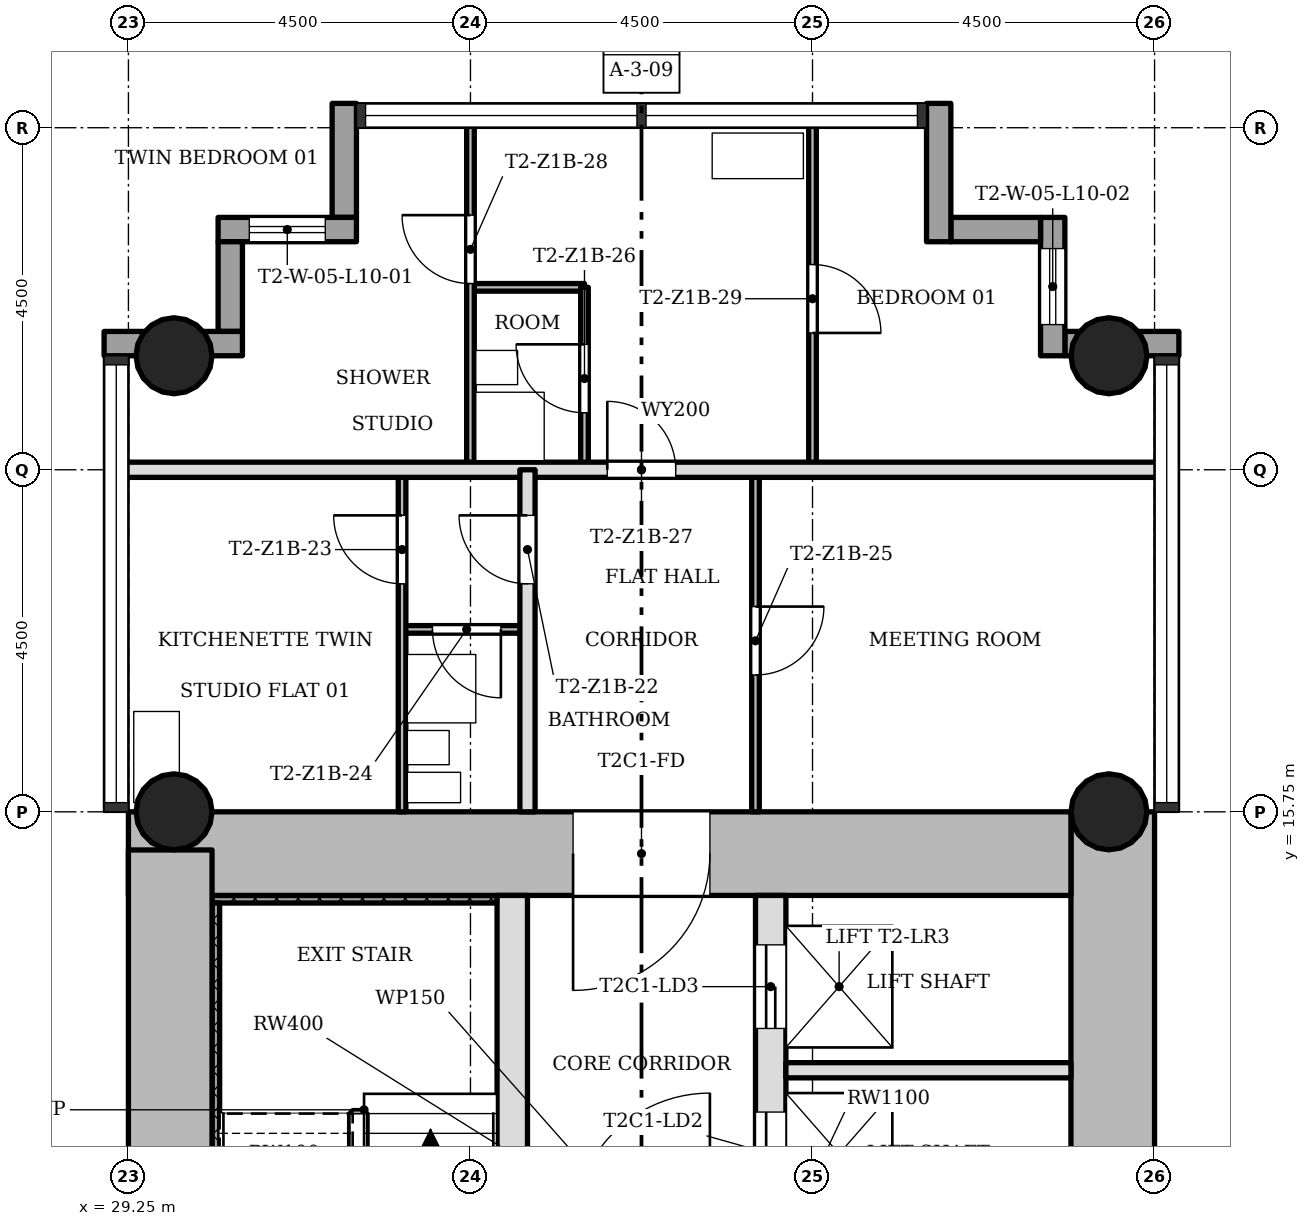
"""IFC4 building model, lengths in metres.
Left out: names, types, materials, properties, quantities, classifications, styles, units other than length and angle.
Written with IfcOpenShell. Run it as: python <this file> out.ifc"""

import sys

from ifc_helpers import new_model, si_unit, direction, frame, frame_2d, origin, origin_2d, place, context, subcontext, project, spatial, rectangle, hollow_circle, extrude, element, fill, save


model = new_model("IFC4")
c1 = context("Model", 3, precision=1e-05, world=origin(), true_north=direction((0.0, 1.0)))
c2 = subcontext(c1, "Body", "Model", "MODEL_VIEW")
j1 = project(units=[si_unit("LENGTHUNIT", "METRE"), si_unit("PLANEANGLEUNIT", "RADIAN")], contexts=[c1])
p1 = place(None, origin())
s1 = spatial("IfcSite", under=j1, at=p1, CompositionType="ELEMENT")
p2 = place(p1, origin())
s2 = spatial("IfcBuilding", under=s1, at=p2, CompositionType="ELEMENT")
p3 = place(p2, frame((0.0, 0.0, 41.5)))
s3 = spatial("IfcBuildingStorey", under=s2, at=p3, CompositionType="ELEMENT", Elevation=41.5)
p4 = place(p3, frame((42.2, 7.85, 0.0), z_axis=(0.0, 0.0, 1.0), x_axis=(0.0, 1.0, 0.0)))
e1 = element("IfcWall", 1, at=p4, inside=s3, PredefinedType="SHEAR", context=c2, shape_type="SweptSolid", body=[
    extrude(rectangle(XDim=7.9, YDim=1.1, at=frame_2d((3.95, 0.0))), origin(), (0.0, 0.0, 1.0), 3.4),
])
p5 = place(p3, frame((41.65, 15.2, 0.0), z_axis=(0.0, 0.0, 1.0), x_axis=(-1.0, 0.0, 0.0)))
e2 = element("IfcWall", 2, at=p5, inside=s3, PredefinedType="SHEAR", context=c2, shape_type="SweptSolid", body=[
    extrude(rectangle(XDim=12.4, YDim=1.1, at=frame_2d((6.2, 0.0))), origin(), (0.0, 0.0, 1.0), 3.4),
])
p6 = place(p5, frame((4.75, 0.0, 0.0)))
e3 = element("IfcOpeningElement", 3, at=p6, cuts=e2, PredefinedType="OPENING", context=c2, shape_type="SweptSolid", body=[
    extrude(rectangle(XDim=1.8, YDim=2.1, at=frame_2d((0.9, 1.05))), frame((0.0, 0.56, 0.0), z_axis=(0.0, -1.0, 0.0), x_axis=(1.0, 0.0, 0.0)), (0.0, 0.0, 1.0), 1.12),
])
p7 = place(p3, frame((29.8, 15.248, 0.0), z_axis=(0.0, 0.0, 1.0), x_axis=(0.0, -1.0, 0.0)))
e4 = element("IfcWall", 4, at=p7, inside=s3, PredefinedType="SHEAR", context=c2, shape_type="SweptSolid", body=[
    extrude(rectangle(XDim=8.596, YDim=1.1, at=frame_2d((4.298, 0.0))), origin(), (0.0, 0.0, 1.0), 3.4),
])
p8 = place(p3, frame((34.3, 7.85, 0.0), z_axis=(0.0, 0.0, 1.0), x_axis=(0.0, 1.0, 0.0)))
e5 = element("IfcWall", 5, at=p8, inside=s3, PredefinedType="SHEAR", context=c2, shape_type="SweptSolid", body=[
    extrude(rectangle(XDim=6.8, YDim=0.4, at=frame_2d((3.4, 0.0))), origin(), (0.0, 0.0, 1.0), 3.4),
])
p9 = place(p8, frame((0.55, 0.0, 0.0)))
e6 = element("IfcOpeningElement", 6, at=p9, cuts=e5, PredefinedType="OPENING", context=c2, shape_type="SweptSolid", body=[
    extrude(rectangle(XDim=0.9, YDim=2.1, at=frame_2d((0.45, 1.05))), frame((0.0, 0.21, 0.0), z_axis=(0.0, -1.0, 0.0), x_axis=(1.0, 0.0, 0.0)), (0.0, 0.0, 1.0), 0.42),
])
p10 = place(p3, frame((37.7, 7.85, 0.0), z_axis=(0.0, 0.0, 1.0), x_axis=(0.0, 1.0, 0.0)))
e7 = element("IfcWall", 7, at=p10, inside=s3, PredefinedType="SHEAR", context=c2, shape_type="SweptSolid", body=[
    extrude(rectangle(XDim=6.8, YDim=0.4, at=frame_2d((3.4, 0.0))), origin(), (0.0, 0.0, 1.0), 3.4),
])
p11 = place(p10, frame((0.65, 0.0, 0.0)))
e8 = element("IfcOpeningElement", 8, at=p11, cuts=e7, PredefinedType="OPENING", context=c2, shape_type="SweptSolid", body=[
    extrude(rectangle(XDim=1.1, YDim=2.1, at=frame_2d((0.55, 1.05))), frame((0.0, 0.21, 0.0), z_axis=(0.0, -1.0, 0.0), x_axis=(1.0, 0.0, 0.0)), (0.0, 0.0, 1.0), 0.42),
])
p12 = place(p10, frame((2.85, 0.0, 0.0)))
e9 = element("IfcOpeningElement", 9, at=p12, cuts=e7, PredefinedType="OPENING", context=c2, shape_type="SweptSolid", body=[
    extrude(rectangle(XDim=1.1, YDim=2.1, at=frame_2d((0.55, 1.05))), frame((0.0, 0.21, 0.0), z_axis=(0.0, -1.0, 0.0), x_axis=(1.0, 0.0, 0.0)), (0.0, 0.0, 1.0), 0.42),
])
p13 = place(p10, frame((5.05, 0.0, 0.0)))
e10 = element("IfcOpeningElement", 10, at=p13, cuts=e7, PredefinedType="OPENING", context=c2, shape_type="SweptSolid", body=[
    extrude(rectangle(XDim=1.1, YDim=2.1, at=frame_2d((0.55, 1.05))), frame((0.0, 0.21, 0.0), z_axis=(0.0, -1.0, 0.0), x_axis=(1.0, 0.0, 0.0)), (0.0, 0.0, 1.0), 0.42),
])
for number, where, z_axis, x_axis in (
    (11, (42.15, 15.75, 0.0), (0.0, 0.0, 1.0), (1.0, 0.0, 0.0)),
    (12, (29.85, 15.75, 0.0), (0.0, 0.0, 1.0), (1.0, 0.0, 0.0)),
    (13, (42.15, 21.75, 0.0), (0.0, 0.0, 1.0), (1.0, 0.0, 0.0)),
    (14, (29.85, 21.75, 0.0), (0.0, 0.0, 1.0), (1.0, 0.0, 0.0)),
):
    element("IfcColumn", number, at=place(p3, frame(where, z_axis=z_axis, x_axis=x_axis)), inside=s3, PredefinedType="COLUMN", context=c2, shape_type="SweptSolid", body=[
        extrude(hollow_circle(Radius=0.5, WallThickness=0.036, at=origin_2d()), origin(), (0.0, 0.0, 1.0), 3.4),
    ])
p14 = place(p3, frame((43.07, 21.91, -0.3), z_axis=(0.0, 0.0, 1.0), x_axis=(-1.0, 0.0, 0.0)))
e15 = element("IfcWall", 15, at=p14, inside=s3, PredefinedType="STANDARD", context=c2, shape_type="SweptSolid", body=[
    extrude(rectangle(XDim=1.5, YDim=0.32, at=frame_2d((0.75, 0.0))), origin(), (0.0, 0.0, 1.0), 3.4),
])
p15 = place(p3, frame((41.41, 21.75, -0.3), z_axis=(0.0, 0.0, 1.0), x_axis=(0.0, 1.0, 0.0)))
e16 = element("IfcWall", 16, at=p15, inside=s3, PredefinedType="STANDARD", context=c2, shape_type="SweptSolid", body=[
    extrude(rectangle(XDim=1.82, YDim=0.32, at=frame_2d((0.91, 0.0))), origin(), (0.0, 0.0, 1.0), 3.4),
])
p16 = place(p15, frame((0.41, 0.0, 1.2)))
e17 = element("IfcOpeningElement", 17, at=p16, cuts=e16, PredefinedType="OPENING", context=c2, shape_type="SweptSolid", body=[
    extrude(rectangle(XDim=1.0, YDim=1.5, at=frame_2d((0.5, 0.75))), frame((0.0, 0.17, 0.0), z_axis=(0.0, -1.0, 0.0), x_axis=(1.0, 0.0, 0.0)), (0.0, 0.0, 1.0), 0.34),
])
p17 = place(p3, frame((41.25, 23.41, -0.3), z_axis=(0.0, 0.0, 1.0), x_axis=(-1.0, 0.0, 0.0)))
e18 = element("IfcWall", 18, at=p17, inside=s3, PredefinedType="STANDARD", context=c2, shape_type="SweptSolid", body=[
    extrude(rectangle(XDim=1.18, YDim=0.32, at=frame_2d((0.59, 0.0))), origin(), (0.0, 0.0, 1.0), 3.4),
])
p18 = place(p3, frame((39.91, 23.25, -0.3), z_axis=(0.0, 0.0, 1.0), x_axis=(0.0, 1.0, 0.0)))
e19 = element("IfcWall", 19, at=p18, inside=s3, PredefinedType="STANDARD", context=c2, shape_type="SweptSolid", body=[
    extrude(rectangle(XDim=1.82, YDim=0.32, at=frame_2d((0.91, 0.0))), origin(), (0.0, 0.0, 1.0), 3.4),
])
p19 = place(p3, frame((32.09, 25.07, -0.3), z_axis=(0.0, 0.0, 1.0), x_axis=(0.0, -1.0, 0.0)))
e20 = element("IfcWall", 20, at=p19, inside=s3, PredefinedType="STANDARD", context=c2, shape_type="SweptSolid", body=[
    extrude(rectangle(XDim=1.5, YDim=0.32, at=frame_2d((0.75, 0.0))), origin(), (0.0, 0.0, 1.0), 3.4),
])
p20 = place(p3, frame((32.25, 23.41, -0.3), z_axis=(0.0, 0.0, 1.0), x_axis=(-1.0, 0.0, 0.0)))
e21 = element("IfcWall", 21, at=p20, inside=s3, PredefinedType="STANDARD", context=c2, shape_type="SweptSolid", body=[
    extrude(rectangle(XDim=1.82, YDim=0.32, at=frame_2d((0.91, 0.0))), origin(), (0.0, 0.0, 1.0), 3.4),
])
p21 = place(p20, frame((0.41, 0.0, 1.2)))
e22 = element("IfcOpeningElement", 22, at=p21, cuts=e21, PredefinedType="OPENING", context=c2, shape_type="SweptSolid", body=[
    extrude(rectangle(XDim=1.0, YDim=1.5, at=frame_2d((0.5, 0.75))), frame((0.0, 0.17, 0.0), z_axis=(0.0, -1.0, 0.0), x_axis=(1.0, 0.0, 0.0)), (0.0, 0.0, 1.0), 0.34),
])
p22 = place(p3, frame((30.59, 23.25, -0.3), z_axis=(0.0, 0.0, 1.0), x_axis=(0.0, -1.0, 0.0)))
e23 = element("IfcWall", 23, at=p22, inside=s3, PredefinedType="STANDARD", context=c2, shape_type="SweptSolid", body=[
    extrude(rectangle(XDim=1.18, YDim=0.32, at=frame_2d((0.59, 0.0))), origin(), (0.0, 0.0, 1.0), 3.4),
])
p23 = place(p3, frame((30.75, 21.91, -0.3), z_axis=(0.0, 0.0, 1.0), x_axis=(-1.0, 0.0, 0.0)))
e24 = element("IfcWall", 24, at=p23, inside=s3, PredefinedType="STANDARD", context=c2, shape_type="SweptSolid", body=[
    extrude(rectangle(XDim=1.82, YDim=0.32, at=frame_2d((0.91, 0.0))), origin(), (0.0, 0.0, 1.0), 3.4),
])
p24 = place(p3, frame((41.65, 12.35, 0.0), z_axis=(0.0, 0.0, 1.0), x_axis=(-1.0, 0.0, 0.0)))
e25 = element("IfcWall", 25, at=p24, inside=s3, PredefinedType="SOLIDWALL", context=c2, shape_type="SweptSolid", body=[
    extrude(rectangle(XDim=3.75, YDim=0.2, at=frame_2d((1.875, 0.0))), origin(), (0.0, 0.0, 1.0), 3.0),
])
p25 = place(p3, frame((34.5, 18.15, 0.0), z_axis=(0.0, 0.0, 1.0), x_axis=(-1.0, 0.0, 0.0)))
e26 = element("IfcWall", 26, at=p25, inside=s3, PredefinedType="PARTITIONING", context=c2, shape_type="SweptSolid", body=[
    extrude(rectangle(XDim=1.65, YDim=0.1, at=frame_2d((0.825, 0.0))), origin(), (0.0, 0.0, 1.0), 3.0),
])
p26 = place(p25, frame((0.35, 0.0, 0.0)))
e27 = element("IfcOpeningElement", 27, at=p26, cuts=e26, PredefinedType="OPENING", context=c2, shape_type="SweptSolid", body=[
    extrude(rectangle(XDim=0.9, YDim=2.1, at=frame_2d((0.45, 1.05))), frame((0.0, 0.06, 0.0), z_axis=(0.0, -1.0, 0.0), x_axis=(1.0, 0.0, 0.0)), (0.0, 0.0, 1.0), 0.12),
])
p27 = place(p3, frame((42.85, 20.25, 0.0), z_axis=(0.0, 0.0, 1.0), x_axis=(-1.0, 0.0, 0.0)))
e28 = element("IfcWall", 28, at=p27, inside=s3, PredefinedType="SOLIDWALL", context=c2, shape_type="SweptSolid", body=[
    extrude(rectangle(XDim=13.7, YDim=0.2, at=frame_2d((6.85, 0.0))), origin(), (0.0, 0.0, 1.0), 3.0),
])
p28 = place(p27, frame((6.4, 0.0, 0.0)))
e29 = element("IfcOpeningElement", 29, at=p28, cuts=e28, PredefinedType="OPENING", context=c2, shape_type="SweptSolid", body=[
    extrude(rectangle(XDim=0.9, YDim=2.1, at=frame_2d((0.45, 1.05))), frame((0.0, 0.11, 0.0), z_axis=(0.0, -1.0, 0.0), x_axis=(1.0, 0.0, 0.0)), (0.0, 0.0, 1.0), 0.22),
])
p29 = place(p3, frame((35.25, 22.65, 0.0), z_axis=(0.0, 0.0, 1.0), x_axis=(-1.0, 0.0, 0.0)))
e30 = element("IfcWall", 30, at=p29, inside=s3, PredefinedType="PARTITIONING", context=c2, shape_type="SweptSolid", body=[
    extrude(rectangle(XDim=1.5, YDim=0.1, at=frame_2d((0.75, 0.0))), origin(), (0.0, 0.0, 1.0), 3.0),
])
p30 = place(p3, frame((38.25, 20.25, 0.0), z_axis=(0.0, 0.0, 1.0), x_axis=(0.0, 1.0, 0.0)))
e31 = element("IfcWall", 31, at=p30, inside=s3, PredefinedType="PARTITIONING", context=c2, shape_type="SweptSolid", body=[
    extrude(rectangle(XDim=4.6, YDim=0.1, at=frame_2d((2.3, 0.0))), origin(), (0.0, 0.0, 1.0), 3.0),
])
p31 = place(p30, frame((1.8, 0.0, 0.0)))
e32 = element("IfcOpeningElement", 32, at=p31, cuts=e31, PredefinedType="OPENING", context=c2, shape_type="SweptSolid", body=[
    extrude(rectangle(XDim=0.9, YDim=2.1, at=frame_2d((0.45, 1.05))), frame((0.0, 0.06, 0.0), z_axis=(0.0, -1.0, 0.0), x_axis=(1.0, 0.0, 0.0)), (0.0, 0.0, 1.0), 0.12),
])
p32 = place(p3, frame((37.5, 15.75, 0.0), z_axis=(0.0, 0.0, 1.0), x_axis=(0.0, 1.0, 0.0)))
e33 = element("IfcWall", 33, at=p32, inside=s3, PredefinedType="PARTITIONING", context=c2, shape_type="SweptSolid", body=[
    extrude(rectangle(XDim=4.5, YDim=0.1, at=frame_2d((2.25, 0.0))), origin(), (0.0, 0.0, 1.0), 3.0),
])
p33 = place(p32, frame((1.8, 0.0, 0.0)))
e34 = element("IfcOpeningElement", 34, at=p33, cuts=e33, PredefinedType="OPENING", context=c2, shape_type="SweptSolid", body=[
    extrude(rectangle(XDim=0.9, YDim=2.1, at=frame_2d((0.45, 1.05))), frame((0.0, 0.06, 0.0), z_axis=(0.0, -1.0, 0.0), x_axis=(1.0, 0.0, 0.0)), (0.0, 0.0, 1.0), 0.12),
])
p34 = place(p3, frame((35.25, 20.25, 0.0), z_axis=(0.0, 0.0, 1.0), x_axis=(0.0, 1.0, 0.0)))
e35 = element("IfcWall", 35, at=p34, inside=s3, PredefinedType="PARTITIONING", context=c2, shape_type="SweptSolid", body=[
    extrude(rectangle(XDim=2.4, YDim=0.1, at=frame_2d((1.2, 0.0))), origin(), (0.0, 0.0, 1.0), 3.0),
])
p35 = place(p34, frame((0.75, 0.0, 0.0)))
e36 = element("IfcOpeningElement", 36, at=p35, cuts=e35, PredefinedType="OPENING", context=c2, shape_type="SweptSolid", body=[
    extrude(rectangle(XDim=0.9, YDim=2.1, at=frame_2d((0.45, 1.05))), frame((0.0, 0.06, 0.0), z_axis=(0.0, -1.0, 0.0), x_axis=(1.0, 0.0, 0.0)), (0.0, 0.0, 1.0), 0.12),
])
p36 = place(p3, frame((34.5, 15.75, 0.0), z_axis=(0.0, 0.0, 1.0), x_axis=(0.0, 1.0, 0.0)))
e37 = element("IfcWall", 37, at=p36, inside=s3, PredefinedType="SOLIDWALL", context=c2, shape_type="SweptSolid", body=[
    extrude(rectangle(XDim=4.5, YDim=0.2, at=frame_2d((2.25, 0.0))), origin(), (0.0, 0.0, 1.0), 3.0),
])
p37 = place(p36, frame((3.0, 0.0, 0.0)))
e38 = element("IfcOpeningElement", 38, at=p37, cuts=e37, PredefinedType="OPENING", context=c2, shape_type="SweptSolid", body=[
    extrude(rectangle(XDim=0.9, YDim=2.1, at=frame_2d((0.45, 1.05))), frame((0.0, 0.11, 0.0), z_axis=(0.0, -1.0, 0.0), x_axis=(1.0, 0.0, 0.0)), (0.0, 0.0, 1.0), 0.22),
])
p38 = place(p3, frame((33.75, 20.25, 0.0), z_axis=(0.0, 0.0, 1.0), x_axis=(0.0, 1.0, 0.0)))
e39 = element("IfcWall", 39, at=p38, inside=s3, PredefinedType="PARTITIONING", context=c2, shape_type="SweptSolid", body=[
    extrude(rectangle(XDim=4.6, YDim=0.1, at=frame_2d((2.3, 0.0))), origin(), (0.0, 0.0, 1.0), 3.0),
])
p39 = place(p38, frame((2.45, 0.0, 0.0)))
e40 = element("IfcOpeningElement", 40, at=p39, cuts=e39, PredefinedType="OPENING", context=c2, shape_type="SweptSolid", body=[
    extrude(rectangle(XDim=0.9, YDim=2.1, at=frame_2d((0.45, 1.05))), frame((0.0, 0.06, 0.0), z_axis=(0.0, -1.0, 0.0), x_axis=(1.0, 0.0, 0.0)), (0.0, 0.0, 1.0), 0.12),
])
p40 = place(p3, frame((32.85, 15.75, 0.0), z_axis=(0.0, 0.0, 1.0), x_axis=(0.0, 1.0, 0.0)))
e41 = element("IfcWall", 41, at=p40, inside=s3, PredefinedType="PARTITIONING", context=c2, shape_type="SweptSolid", body=[
    extrude(rectangle(XDim=4.5, YDim=0.1, at=frame_2d((2.25, 0.0))), origin(), (0.0, 0.0, 1.0), 3.0),
])
p41 = place(p40, frame((3.0, 0.0, 0.0)))
e42 = element("IfcOpeningElement", 42, at=p41, cuts=e41, PredefinedType="OPENING", context=c2, shape_type="SweptSolid", body=[
    extrude(rectangle(XDim=0.9, YDim=2.1, at=frame_2d((0.45, 1.05))), frame((0.0, 0.06, 0.0), z_axis=(0.0, -1.0, 0.0), x_axis=(1.0, 0.0, 0.0)), (0.0, 0.0, 1.0), 0.12),
])
p42 = place(p3, frame((34.1, 14.6, 0.0), z_axis=(0.0, 0.0, 1.0), x_axis=(-1.0, 0.0, 0.0)))
e43 = element("IfcWall", 43, at=p42, inside=s3, PredefinedType="SHEAR", context=c2, shape_type="SweptSolid", body=[
    extrude(rectangle(XDim=3.75, YDim=0.1, at=frame_2d((1.875, 0.0))), origin(), (0.0, 0.0, 1.0), 3.4),
])
p43 = place(p3, frame((30.4, 7.95, 0.0), z_axis=(0.0, 0.0, 1.0), x_axis=(0.0, 1.0, 0.0)))
e44 = element("IfcWall", 44, at=p43, inside=s3, PredefinedType="SHEAR", context=c2, shape_type="SweptSolid", body=[
    extrude(rectangle(XDim=6.6, YDim=0.1, at=frame_2d((3.3, 0.0))), origin(), (0.0, 0.0, 1.0), 3.4),
])
p44 = place(p37, origin())
e45 = element("IfcDoor", 45, at=p44, inside=s3, OperationType="SINGLE_SWING_LEFT", PredefinedType="DOOR", context=c2, shape_type="SweptSolid", body=[
    extrude(rectangle(XDim=0.9, YDim=2.1, at=frame_2d((0.45, 1.05))), frame((0.0, 0.025, 0.0), z_axis=(0.0, -1.0, 0.0), x_axis=(1.0, 0.0, 0.0)), (0.0, 0.0, 1.0), 0.05),
])
fill(e38, e45)
p45 = place(p41, origin())
e46 = element("IfcDoor", 46, at=p45, inside=s3, OperationType="SINGLE_SWING_LEFT", PredefinedType="DOOR", context=c2, shape_type="SweptSolid", body=[
    extrude(rectangle(XDim=0.9, YDim=2.1, at=frame_2d((0.45, 1.05))), frame((0.0, 0.025, 0.0), z_axis=(0.0, -1.0, 0.0), x_axis=(1.0, 0.0, 0.0)), (0.0, 0.0, 1.0), 0.05),
])
fill(e42, e46)
p46 = place(p26, origin())
e47 = element("IfcDoor", 47, at=p46, inside=s3, OperationType="SINGLE_SWING_RIGHT", PredefinedType="DOOR", context=c2, shape_type="SweptSolid", body=[
    extrude(rectangle(XDim=0.9, YDim=2.1, at=frame_2d((0.45, 1.05))), frame((0.0, 0.025, 0.0), z_axis=(0.0, -1.0, 0.0), x_axis=(1.0, 0.0, 0.0)), (0.0, 0.0, 1.0), 0.05),
])
fill(e27, e47)
p47 = place(p33, origin())
e48 = element("IfcDoor", 48, at=p47, inside=s3, OperationType="SINGLE_SWING_RIGHT", PredefinedType="DOOR", context=c2, shape_type="SweptSolid", body=[
    extrude(rectangle(XDim=0.9, YDim=2.1, at=frame_2d((0.45, 1.05))), frame((0.0, 0.025, 0.0), z_axis=(0.0, -1.0, 0.0), x_axis=(1.0, 0.0, 0.0)), (0.0, 0.0, 1.0), 0.05),
])
fill(e34, e48)
p48 = place(p35, origin())
e49 = element("IfcDoor", 49, at=p48, inside=s3, OperationType="SINGLE_SWING_LEFT", PredefinedType="DOOR", context=c2, shape_type="SweptSolid", body=[
    extrude(rectangle(XDim=0.9, YDim=2.1, at=frame_2d((0.45, 1.05))), frame((0.0, 0.025, 0.0), z_axis=(0.0, -1.0, 0.0), x_axis=(1.0, 0.0, 0.0)), (0.0, 0.0, 1.0), 0.05),
])
fill(e36, e49)
p49 = place(p28, origin())
e50 = element("IfcDoor", 50, at=p49, inside=s3, OperationType="SINGLE_SWING_RIGHT", PredefinedType="DOOR", context=c2, shape_type="SweptSolid", body=[
    extrude(rectangle(XDim=0.9, YDim=2.1, at=frame_2d((0.45, 1.05))), frame((0.0, 0.025, 0.0), z_axis=(0.0, -1.0, 0.0), x_axis=(1.0, 0.0, 0.0)), (0.0, 0.0, 1.0), 0.05),
])
fill(e29, e50)
p50 = place(p39, origin())
e51 = element("IfcDoor", 51, at=p50, inside=s3, OperationType="SINGLE_SWING_LEFT", PredefinedType="DOOR", context=c2, shape_type="SweptSolid", body=[
    extrude(rectangle(XDim=0.9, YDim=2.1, at=frame_2d((0.45, 1.05))), frame((0.0, 0.025, 0.0), z_axis=(0.0, -1.0, 0.0), x_axis=(1.0, 0.0, 0.0)), (0.0, 0.0, 1.0), 0.05),
])
fill(e40, e51)
p51 = place(p31, origin())
e52 = element("IfcDoor", 52, at=p51, inside=s3, OperationType="SINGLE_SWING_LEFT", PredefinedType="DOOR", context=c2, shape_type="SweptSolid", body=[
    extrude(rectangle(XDim=0.9, YDim=2.1, at=frame_2d((0.45, 1.05))), frame((0.0, 0.025, 0.0), z_axis=(0.0, -1.0, 0.0), x_axis=(1.0, 0.0, 0.0)), (0.0, 0.0, 1.0), 0.05),
])
fill(e32, e52)
p52 = place(p12, origin())
e53 = element("IfcDoor", 53, at=p52, inside=s3, OperationType="SLIDING_TO_LEFT", PredefinedType="DOOR", context=c2, shape_type="SweptSolid", body=[
    extrude(rectangle(XDim=1.1, YDim=2.1, at=frame_2d((0.55, 1.05))), frame((0.0, 0.025, 0.0), z_axis=(0.0, -1.0, 0.0), x_axis=(1.0, 0.0, 0.0)), (0.0, 0.0, 1.0), 0.05),
])
fill(e9, e53)
p53 = place(p13, origin())
e54 = element("IfcDoor", 54, at=p53, inside=s3, OperationType="SLIDING_TO_LEFT", PredefinedType="DOOR", context=c2, shape_type="SweptSolid", body=[
    extrude(rectangle(XDim=1.1, YDim=2.1, at=frame_2d((0.55, 1.05))), frame((0.0, 0.025, 0.0), z_axis=(0.0, -1.0, 0.0), x_axis=(1.0, 0.0, 0.0)), (0.0, 0.0, 1.0), 0.05),
])
fill(e10, e54)
p54 = place(p6, origin())
e55 = element("IfcDoor", 55, at=p54, inside=s3, OperationType="SINGLE_SWING_LEFT", PredefinedType="DOOR", context=c2, shape_type="SweptSolid", body=[
    extrude(rectangle(XDim=1.8, YDim=2.1, at=frame_2d((0.9, 1.05))), frame((0.0, 0.025, 0.0), z_axis=(0.0, -1.0, 0.0), x_axis=(1.0, 0.0, 0.0)), (0.0, 0.0, 1.0), 0.05),
])
fill(e3, e55)
p55 = place(p21, origin())
e56 = element("IfcWindow", 56, at=p55, inside=s3, PartitioningType="SINGLE_PANEL", PredefinedType="WINDOW", context=c2, shape_type="SweptSolid", body=[
    extrude(rectangle(XDim=1.0, YDim=1.5, at=frame_2d((0.5, 0.75))), frame((0.0, 0.03, 0.0), z_axis=(0.0, -1.0, 0.0), x_axis=(1.0, 0.0, 0.0)), (0.0, 0.0, 1.0), 0.06),
])
fill(e22, e56)
p56 = place(p16, origin())
e57 = element("IfcWindow", 57, at=p56, inside=s3, PartitioningType="SINGLE_PANEL", PredefinedType="WINDOW", context=c2, shape_type="SweptSolid", body=[
    extrude(rectangle(XDim=1.0, YDim=1.5, at=frame_2d((0.5, 0.75))), frame((0.0, 0.03, 0.0), z_axis=(0.0, -1.0, 0.0), x_axis=(1.0, 0.0, 0.0)), (0.0, 0.0, 1.0), 0.06),
])
fill(e17, e57)
save(model, sys.argv[1])
